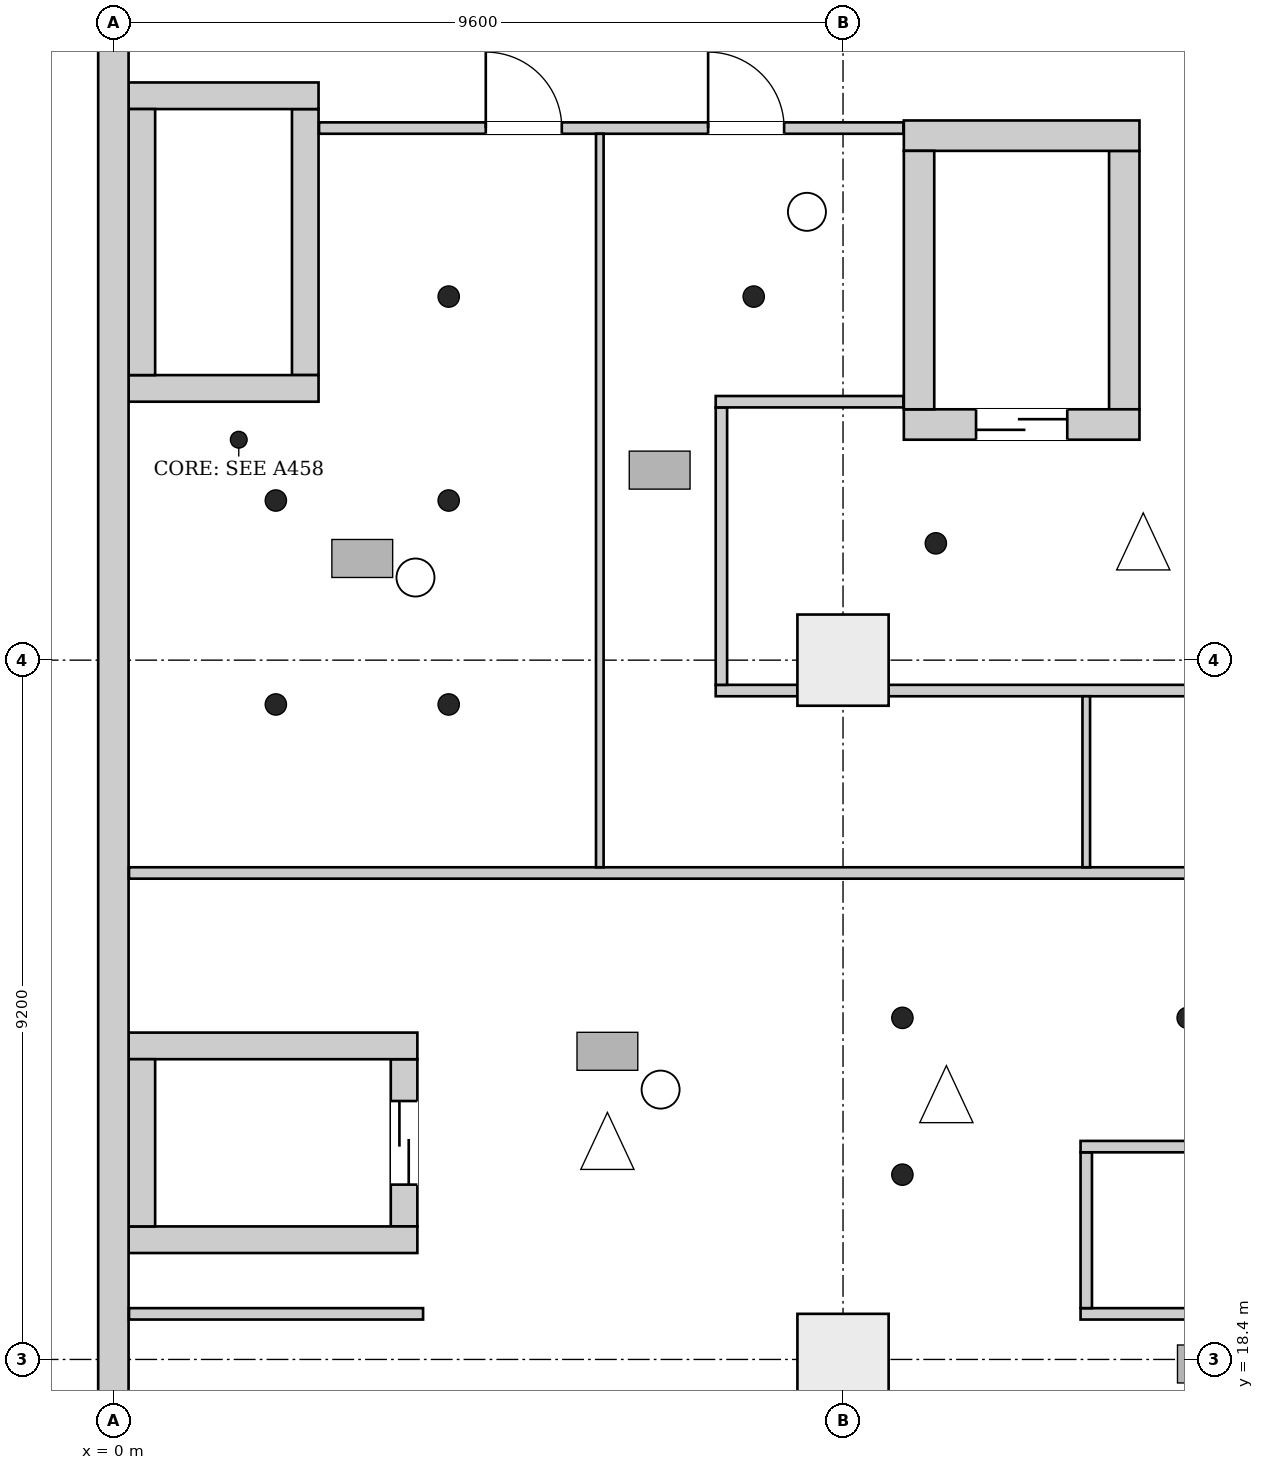
"""IFC4 building model, lengths in metres.
Left out: names, types, materials, properties, quantities, classifications, styles, units other than length and angle.
Written with IfcOpenShell. Run it as: python <this file> out.ifc"""

import sys

from ifc_helpers import new_model, si_unit, direction, frame, frame_2d, origin, origin_2d, place, context, subcontext, project, spatial, rectangle, extrude, element, fill, save


model = new_model("IFC4")
c1 = context("Model", 3, precision=1e-05, world=origin(), true_north=direction((0.0, 1.0)))
c2 = subcontext(c1, "Body", "Model", "MODEL_VIEW")
j1 = project(units=[si_unit("LENGTHUNIT", "METRE"), si_unit("PLANEANGLEUNIT", "RADIAN")], contexts=[c1])
p1 = place(None, origin())
s1 = spatial("IfcSite", under=j1, at=p1, CompositionType="ELEMENT")
p2 = place(p1, origin())
s2 = spatial("IfcBuilding", under=s1, at=p2, CompositionType="ELEMENT")
p3 = place(p2, frame((0.0, 0.0, 21.7)))
s3 = spatial("IfcBuildingStorey", under=s2, at=p3, CompositionType="ELEMENT", Elevation=21.7)
p4 = place(p3, frame((0.0, -0.2, 0.0), z_axis=(0.0, 0.0, 1.0), x_axis=(0.0, 1.0, 0.0)))
e1 = element("IfcWall", 1, at=p4, inside=s3, PredefinedType="SHEAR", context=c2, shape_type="SweptSolid", body=[
    extrude(rectangle(XDim=46.88, YDim=0.4, at=frame_2d((23.44, 0.0))), origin(), (0.0, 0.0, 1.0), 5.0),
])
for number, where, z_axis, x_axis in (
    (2, (0.2, 19.975, 0.0), (0.0, 0.0, 1.0), (1.0, 0.0, 0.0)),
    (3, (0.2, 22.525, 0.0), (0.0, 0.0, 1.0), (1.0, 0.0, 0.0)),
):
    element("IfcWall", number, at=place(p3, frame(where, z_axis=z_axis, x_axis=x_axis)), inside=s3, PredefinedType="SHEAR", context=c2, shape_type="SweptSolid", body=[
        extrude(rectangle(XDim=3.8, YDim=0.35, at=frame_2d((1.9, 0.0))), origin(), (0.0, 0.0, 1.0), 5.0),
    ])
p5 = place(p3, frame((0.375, 20.15, 0.0), z_axis=(0.0, 0.0, 1.0), x_axis=(0.0, 1.0, 0.0)))
e4 = element("IfcWall", 4, at=p5, inside=s3, PredefinedType="SHEAR", context=c2, shape_type="SweptSolid", body=[
    extrude(rectangle(XDim=2.2, YDim=0.35, at=frame_2d((1.1, 0.0))), origin(), (0.0, 0.0, 1.0), 5.0),
])
p6 = place(p3, frame((3.825, 20.15, 0.0), z_axis=(0.0, 0.0, 1.0), x_axis=(0.0, 1.0, 0.0)))
e5 = element("IfcWall", 5, at=p6, inside=s3, PredefinedType="SHEAR", context=c2, shape_type="SweptSolid", body=[
    extrude(rectangle(XDim=2.2, YDim=0.35, at=frame_2d((1.1, 0.0))), origin(), (0.0, 0.0, 1.0), 5.0),
])
p7 = place(p6, frame((0.55, 0.0, 0.0)))
e6 = element("IfcOpeningElement", 6, at=p7, cuts=e5, PredefinedType="OPENING", context=c2, shape_type="SweptSolid", body=[
    extrude(rectangle(XDim=1.1, YDim=2.1, at=frame_2d((0.55, 1.05))), frame((0.0, 0.185, 0.0), z_axis=(0.0, -1.0, 0.0), x_axis=(1.0, 0.0, 0.0)), (0.0, 0.0, 1.0), 0.37),
])
for number, where, z_axis, x_axis in (
    (7, (0.2, 31.175, 0.0), (0.0, 0.0, 1.0), (1.0, 0.0, 0.0)),
    (8, (0.2, 35.025, 0.0), (0.0, 0.0, 1.0), (1.0, 0.0, 0.0)),
):
    element("IfcWall", number, at=place(p3, frame(where, z_axis=z_axis, x_axis=x_axis)), inside=s3, PredefinedType="SHEAR", context=c2, shape_type="SweptSolid", body=[
        extrude(rectangle(XDim=2.5, YDim=0.35, at=frame_2d((1.25, 0.0))), origin(), (0.0, 0.0, 1.0), 5.0),
    ])
for number, where, z_axis, x_axis in (
    (9, (0.375, 31.35, 0.0), (0.0, 0.0, 1.0), (0.0, 1.0, 0.0)),
    (10, (2.525, 31.35, 0.0), (0.0, 0.0, 1.0), (0.0, 1.0, 0.0)),
):
    element("IfcWall", number, at=place(p3, frame(where, z_axis=z_axis, x_axis=x_axis)), inside=s3, PredefinedType="SHEAR", context=c2, shape_type="SweptSolid", body=[
        extrude(rectangle(XDim=3.5, YDim=0.35, at=frame_2d((1.75, 0.0))), origin(), (0.0, 0.0, 1.0), 5.0),
    ])
p8 = place(p3, frame((10.4, 30.7, 0.0), z_axis=(0.0, 0.0, 1.0), x_axis=(1.0, 0.0, 0.0)))
e11 = element("IfcWall", 11, at=p8, inside=s3, PredefinedType="SHEAR", context=c2, shape_type="SweptSolid", body=[
    extrude(rectangle(XDim=3.1, YDim=0.4, at=frame_2d((1.55, 0.0))), origin(), (0.0, 0.0, 1.0), 5.0),
])
p9 = place(p8, frame((0.95, 0.0, 0.0)))
e12 = element("IfcOpeningElement", 12, at=p9, cuts=e11, PredefinedType="OPENING", context=c2, shape_type="SweptSolid", body=[
    extrude(rectangle(XDim=1.2, YDim=2.1, at=frame_2d((0.6, 1.05))), frame((0.0, 0.21, 0.0), z_axis=(0.0, -1.0, 0.0), x_axis=(1.0, 0.0, 0.0)), (0.0, 0.0, 1.0), 0.42),
])
p10 = place(p3, frame((10.4, 34.5, 0.0), z_axis=(0.0, 0.0, 1.0), x_axis=(1.0, 0.0, 0.0)))
e13 = element("IfcWall", 13, at=p10, inside=s3, PredefinedType="SHEAR", context=c2, shape_type="SweptSolid", body=[
    extrude(rectangle(XDim=3.1, YDim=0.4, at=frame_2d((1.55, 0.0))), origin(), (0.0, 0.0, 1.0), 5.0),
])
for number, where, z_axis, x_axis in (
    (14, (10.6, 30.9, 0.0), (0.0, 0.0, 1.0), (0.0, 1.0, 0.0)),
    (15, (13.3, 30.9, 0.0), (0.0, 0.0, 1.0), (0.0, 1.0, 0.0)),
):
    element("IfcWall", number, at=place(p3, frame(where, z_axis=z_axis, x_axis=x_axis)), inside=s3, PredefinedType="SHEAR", context=c2, shape_type="SweptSolid", body=[
        extrude(rectangle(XDim=3.4, YDim=0.4, at=frame_2d((1.7, 0.0))), origin(), (0.0, 0.0, 1.0), 5.0),
    ])
for number, where, z_axis, x_axis in (
    (16, (9.6, 18.4, 0.0), (0.0, 0.0, 1.0), (1.0, 0.0, 0.0)),
    (17, (9.6, 27.6, 0.0), (0.0, 0.0, 1.0), (1.0, 0.0, 0.0)),
):
    element("IfcColumn", number, at=place(p3, frame(where, z_axis=z_axis, x_axis=x_axis)), inside=s3, PredefinedType="COLUMN", context=c2, shape_type="SweptSolid", body=[
        extrude(rectangle(XDim=1.2, YDim=1.2, at=origin_2d()), origin(), (0.0, 0.0, 1.0), 5.0),
    ])
p11 = place(p3, frame((0.206, 19.0, 0.0), z_axis=(0.0, 0.0, 1.0), x_axis=(1.0, 0.0, 0.0)))
e18 = element("IfcWall", 18, at=p11, inside=s3, PredefinedType="PARTITIONING", context=c2, shape_type="SweptSolid", body=[
    extrude(rectangle(XDim=3.869, YDim=0.15, at=frame_2d((1.935, 0.0))), origin(), (0.0, 0.0, 1.0), 4.65),
])
p12 = place(p3, frame((0.206, 24.8, 0.0), z_axis=(0.0, 0.0, 1.0), x_axis=(1.0, 0.0, 0.0)))
e19 = element("IfcWall", 19, at=p12, inside=s3, PredefinedType="PARTITIONING", context=c2, shape_type="SweptSolid", body=[
    extrude(rectangle(XDim=39.119, YDim=0.15, at=frame_2d((19.56, 0.0))), origin(), (0.0, 0.0, 1.0), 4.65),
])
p13 = place(p12, frame((15.294, 0.0, 0.0)))
e20 = element("IfcOpeningElement", 20, at=p13, cuts=e19, PredefinedType="OPENING", context=c2, shape_type="SweptSolid", body=[
    extrude(rectangle(XDim=1.0, YDim=2.1, at=frame_2d((0.5, 1.05))), frame((0.0, 0.085, 0.0), z_axis=(0.0, -1.0, 0.0), x_axis=(1.0, 0.0, 0.0)), (0.0, 0.0, 1.0), 0.17),
])
p14 = place(p12, frame((21.694, 0.0, 0.0)))
e21 = element("IfcOpeningElement", 21, at=p14, cuts=e19, PredefinedType="OPENING", context=c2, shape_type="SweptSolid", body=[
    extrude(rectangle(XDim=1.0, YDim=2.1, at=frame_2d((0.5, 1.05))), frame((0.0, 0.085, 0.0), z_axis=(0.0, -1.0, 0.0), x_axis=(1.0, 0.0, 0.0)), (0.0, 0.0, 1.0), 0.17),
])
p15 = place(p12, frame((28.094, 0.0, 0.0)))
e22 = element("IfcOpeningElement", 22, at=p15, cuts=e19, PredefinedType="OPENING", context=c2, shape_type="SweptSolid", body=[
    extrude(rectangle(XDim=1.0, YDim=2.1, at=frame_2d((0.5, 1.05))), frame((0.0, 0.085, 0.0), z_axis=(0.0, -1.0, 0.0), x_axis=(1.0, 0.0, 0.0)), (0.0, 0.0, 1.0), 0.17),
])
p16 = place(p3, frame((2.706, 34.6, 0.0), z_axis=(0.0, 0.0, 1.0), x_axis=(1.0, 0.0, 0.0)))
e23 = element("IfcWall", 23, at=p16, inside=s3, PredefinedType="PARTITIONING", context=c2, shape_type="SweptSolid", body=[
    extrude(rectangle(XDim=7.688, YDim=0.15, at=frame_2d((3.844, 0.0))), origin(), (0.0, 0.0, 1.0), 4.65),
])
p17 = place(p16, frame((2.194, 0.0, 0.0)))
e24 = element("IfcOpeningElement", 24, at=p17, cuts=e23, PredefinedType="OPENING", context=c2, shape_type="SweptSolid", body=[
    extrude(rectangle(XDim=1.0, YDim=2.1, at=frame_2d((0.5, 1.05))), frame((0.0, 0.085, 0.0), z_axis=(0.0, -1.0, 0.0), x_axis=(1.0, 0.0, 0.0)), (0.0, 0.0, 1.0), 0.17),
])
p18 = place(p16, frame((5.119, 0.0, 0.0)))
e25 = element("IfcOpeningElement", 25, at=p18, cuts=e23, PredefinedType="OPENING", context=c2, shape_type="SweptSolid", body=[
    extrude(rectangle(XDim=1.0, YDim=2.1, at=frame_2d((0.5, 1.05))), frame((0.0, 0.085, 0.0), z_axis=(0.0, -1.0, 0.0), x_axis=(1.0, 0.0, 0.0)), (0.0, 0.0, 1.0), 0.17),
])
p19 = place(p3, frame((6.4, 24.875, 0.0), z_axis=(0.0, 0.0, 1.0), x_axis=(0.0, 1.0, 0.0)))
e26 = element("IfcWall", 26, at=p19, inside=s3, PredefinedType="PARTITIONING", context=c2, shape_type="SweptSolid", body=[
    extrude(rectangle(XDim=9.65, YDim=0.1, at=frame_2d((4.825, 0.0))), origin(), (0.0, 0.0, 1.0), 4.65),
])
p20 = place(p3, frame((7.925, 27.2, 0.0), z_axis=(0.0, 0.0, 1.0), x_axis=(1.0, 0.0, 0.0)))
e27 = element("IfcWall", 27, at=p20, inside=s3, PredefinedType="PARTITIONING", context=c2, shape_type="SweptSolid", body=[
    extrude(rectangle(XDim=1.075, YDim=0.15, at=frame_2d((0.538, 0.0))), origin(), (0.0, 0.0, 1.0), 4.65),
])
p21 = place(p3, frame((8.0, 27.275, 0.0), z_axis=(0.0, 0.0, 1.0), x_axis=(0.0, 1.0, 0.0)))
e28 = element("IfcWall", 28, at=p21, inside=s3, PredefinedType="PARTITIONING", context=c2, shape_type="SweptSolid", body=[
    extrude(rectangle(XDim=3.65, YDim=0.15, at=frame_2d((1.825, 0.0))), origin(), (0.0, 0.0, 1.0), 4.65),
])
p22 = place(p3, frame((7.925, 31.0, 0.0), z_axis=(0.0, 0.0, 1.0), x_axis=(1.0, 0.0, 0.0)))
e29 = element("IfcWall", 29, at=p22, inside=s3, PredefinedType="PARTITIONING", context=c2, shape_type="SweptSolid", body=[
    extrude(rectangle(XDim=2.469, YDim=0.15, at=frame_2d((1.234, 0.0))), origin(), (0.0, 0.0, 1.0), 4.65),
])
p23 = place(p3, frame((10.2, 27.2, 0.0), z_axis=(0.0, 0.0, 1.0), x_axis=(1.0, 0.0, 0.0)))
e30 = element("IfcWall", 30, at=p23, inside=s3, PredefinedType="PARTITIONING", context=c2, shape_type="SweptSolid", body=[
    extrude(rectangle(XDim=8.4, YDim=0.15, at=frame_2d((4.2, 0.0))), origin(), (0.0, 0.0, 1.0), 4.65),
])
p24 = place(p3, frame((12.725, 19.0, 0.0), z_axis=(0.0, 0.0, 1.0), x_axis=(1.0, 0.0, 0.0)))
e31 = element("IfcWall", 31, at=p24, inside=s3, PredefinedType="PARTITIONING", context=c2, shape_type="SweptSolid", body=[
    extrude(rectangle(XDim=5.875, YDim=0.15, at=frame_2d((2.938, 0.0))), origin(), (0.0, 0.0, 1.0), 4.65),
])
p25 = place(p3, frame((12.8, 19.075, 0.0), z_axis=(0.0, 0.0, 1.0), x_axis=(0.0, 1.0, 0.0)))
e32 = element("IfcWall", 32, at=p25, inside=s3, PredefinedType="PARTITIONING", context=c2, shape_type="SweptSolid", body=[
    extrude(rectangle(XDim=2.05, YDim=0.15, at=frame_2d((1.025, 0.0))), origin(), (0.0, 0.0, 1.0), 4.65),
])
p26 = place(p3, frame((12.725, 21.2, 0.0), z_axis=(0.0, 0.0, 1.0), x_axis=(1.0, 0.0, 0.0)))
e33 = element("IfcWall", 33, at=p26, inside=s3, PredefinedType="PARTITIONING", context=c2, shape_type="SweptSolid", body=[
    extrude(rectangle(XDim=6.55, YDim=0.15, at=frame_2d((3.275, 0.0))), origin(), (0.0, 0.0, 1.0), 4.65),
])
p27 = place(p26, frame((2.775, 0.0, 0.0)))
e34 = element("IfcOpeningElement", 34, at=p27, cuts=e33, PredefinedType="OPENING", context=c2, shape_type="SweptSolid", body=[
    extrude(rectangle(XDim=1.0, YDim=2.1, at=frame_2d((0.5, 1.05))), frame((0.0, 0.085, 0.0), z_axis=(0.0, -1.0, 0.0), x_axis=(1.0, 0.0, 0.0)), (0.0, 0.0, 1.0), 0.17),
])
p28 = place(p3, frame((12.8, 24.875, 0.0), z_axis=(0.0, 0.0, 1.0), x_axis=(0.0, 1.0, 0.0)))
e35 = element("IfcWall", 35, at=p28, inside=s3, PredefinedType="PARTITIONING", context=c2, shape_type="SweptSolid", body=[
    extrude(rectangle(XDim=2.25, YDim=0.1, at=frame_2d((1.125, 0.0))), origin(), (0.0, 0.0, 1.0), 4.65),
])
p29 = place(p7, origin())
e36 = element("IfcDoor", 36, at=p29, inside=s3, OperationType="DOUBLE_DOOR_SLIDING", PredefinedType="DOOR", context=c2, shape_type="SweptSolid", body=[
    extrude(rectangle(XDim=1.1, YDim=2.1, at=frame_2d((0.55, 1.05))), frame((0.0, 0.025, 0.0), z_axis=(0.0, -1.0, 0.0), x_axis=(1.0, 0.0, 0.0)), (0.0, 0.0, 1.0), 0.05),
])
fill(e6, e36)
p30 = place(p9, origin())
e37 = element("IfcDoor", 37, at=p30, inside=s3, OperationType="DOUBLE_DOOR_SLIDING", PredefinedType="DOOR", context=c2, shape_type="SweptSolid", body=[
    extrude(rectangle(XDim=1.2, YDim=2.1, at=frame_2d((0.6, 1.05))), frame((0.0, 0.025, 0.0), z_axis=(0.0, -1.0, 0.0), x_axis=(1.0, 0.0, 0.0)), (0.0, 0.0, 1.0), 0.05),
])
fill(e12, e37)
p31 = place(p17, origin())
e38 = element("IfcDoor", 38, at=p31, inside=s3, OperationType="SINGLE_SWING_RIGHT", PredefinedType="DOOR", context=c2, shape_type="SweptSolid", body=[
    extrude(rectangle(XDim=1.0, YDim=2.1, at=frame_2d((0.5, 1.05))), frame((0.0, 0.025, 0.0), z_axis=(0.0, -1.0, 0.0), x_axis=(1.0, 0.0, 0.0)), (0.0, 0.0, 1.0), 0.05),
])
fill(e24, e38)
p32 = place(p18, origin())
e39 = element("IfcDoor", 39, at=p32, inside=s3, OperationType="SINGLE_SWING_LEFT", PredefinedType="DOOR", context=c2, shape_type="SweptSolid", body=[
    extrude(rectangle(XDim=1.0, YDim=2.1, at=frame_2d((0.5, 1.05))), frame((0.0, 0.025, 0.0), z_axis=(0.0, -1.0, 0.0), x_axis=(1.0, 0.0, 0.0)), (0.0, 0.0, 1.0), 0.05),
])
fill(e25, e39)
save(model, sys.argv[1])
